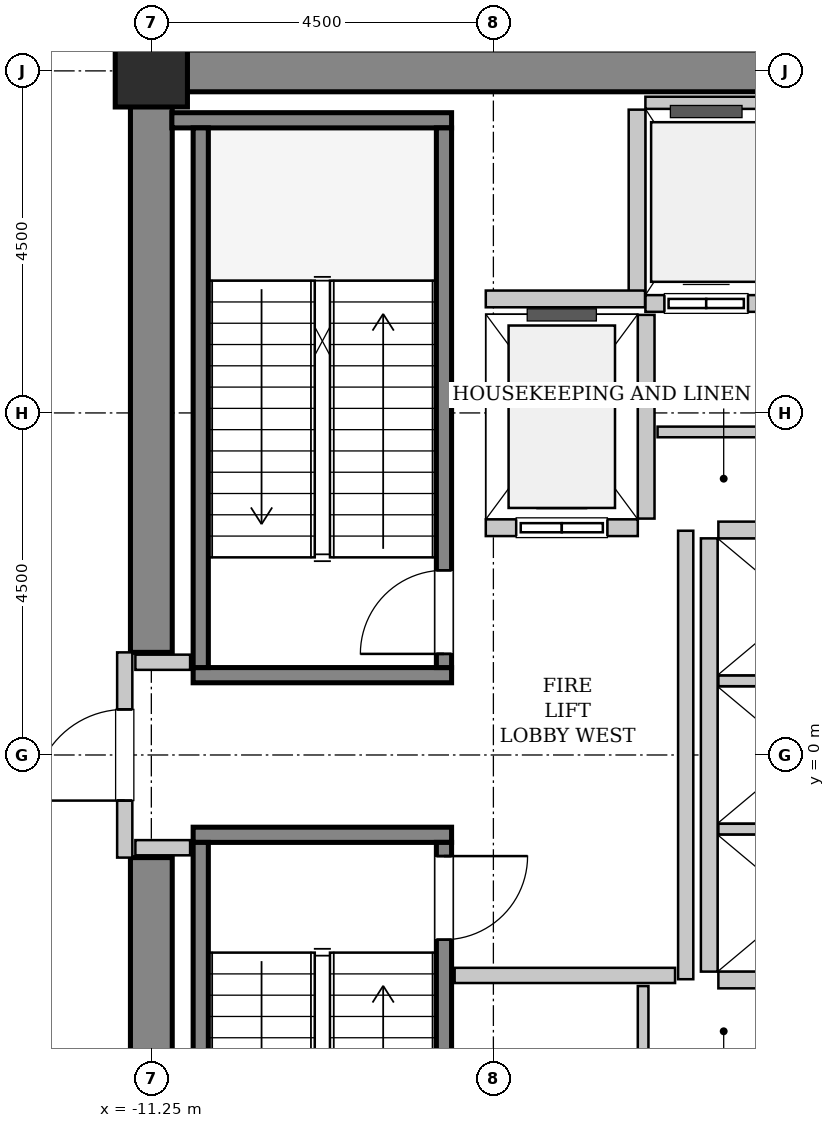
"""IFC4 building model, lengths in metres.
Left out: names, types, materials, properties, quantities, classifications, styles, units other than length and angle.
Written with IfcOpenShell. Run it as: python <this file> out.ifc"""

import sys

from ifc_helpers import new_model, si_unit, direction, frame, frame_2d, origin, origin_2d, place, context, subcontext, project, spatial, rectangle, hollow_rectangle, extrude, source, transform, mapped, element, fill, save


model = new_model("IFC4")
c1 = context("Model", 3, precision=1e-05, world=origin(), true_north=direction((0.0, 1.0)))
c2 = subcontext(c1, "Body", "Model", "MODEL_VIEW")
j1 = project(units=[si_unit("LENGTHUNIT", "METRE"), si_unit("PLANEANGLEUNIT", "RADIAN")], contexts=[c1])
p1 = place(None, origin())
s1 = spatial("IfcSite", under=j1, at=p1, CompositionType="ELEMENT")
p2 = place(p1, origin())
s2 = spatial("IfcBuilding", under=s1, at=p2, CompositionType="ELEMENT")
p3 = place(p2, frame((0.0, 0.0, 144.0)))
s3 = spatial("IfcBuildingStorey", under=s2, at=p3, CompositionType="ELEMENT", Elevation=144.0)
m1 = source(origin(), c2, "Body", "SweptSolid", [
    extrude(rectangle(XDim=9.975, YDim=0.55, at=frame_2d((4.987, 0.0))), origin(), (0.0, 0.0, 1.0), 4.8),
])
p4 = place(p3, frame((-11.525, 9.0, 0.0), z_axis=(0.0, 0.0, 1.0), x_axis=(1.0, 0.0, 0.0)))
e1 = element("IfcWall", 1, at=p4, inside=s3, PredefinedType="SHEAR", context=c2, shape_type="MappedRepresentation", body=[
    mapped(m1, transform((0.0, 0.0, 0.0), x_axis=(1.0, 0.0, 0.0), y_axis=(0.0, 1.0, 0.0), z_axis=(0.0, 0.0, 1.0), scale=1.0)),
])
m2 = source(origin(), c2, "Body", "SweptSolid", [
    extrude(rectangle(XDim=7.375, YDim=0.55, at=frame_2d((3.688, 0.0))), origin(), (0.0, 0.0, 1.0), 4.8),
])
for number, where, z_axis, x_axis in (
    (2, (-11.25, -8.725, 0.0), (0.0, 0.0, 1.0), (0.0, 1.0, 0.0)),
    (3, (-11.25, 1.35, 0.0), (0.0, 0.0, 1.0), (0.0, 1.0, 0.0)),
):
    element("IfcWall", number, at=place(p3, frame(where, z_axis=z_axis, x_axis=x_axis)), inside=s3, PredefinedType="SHEAR", context=c2, shape_type="MappedRepresentation", body=[
        mapped(m2, transform((0.0, 0.0, 0.0), x_axis=(1.0, 0.0, 0.0), y_axis=(0.0, 1.0, 0.0), z_axis=(0.0, 0.0, 1.0), scale=1.0)),
    ])
m3 = source(origin(), c2, "Body", "SweptSolid", [
    extrude(hollow_rectangle(XDim=0.95, YDim=0.95, WallThickness=0.045, InnerFilletRadius=0.045, OuterFilletRadius=0.09, at=origin_2d()), origin(), (0.0, 0.0, 1.0), 4.8),
])
p5 = place(p3, frame((-11.25, 9.0, 0.0), z_axis=(0.0, 0.0, 1.0), x_axis=(1.0, 0.0, 0.0)))
e4 = element("IfcColumn", 4, at=p5, inside=s3, PredefinedType="COLUMN", context=c2, shape_type="MappedRepresentation", body=[
    mapped(m3, transform((0.0, 0.0, 0.0), x_axis=(1.0, 0.0, 0.0), y_axis=(0.0, 1.0, 0.0), z_axis=(0.0, 0.0, 1.0), scale=1.0)),
])
m4 = source(origin(), c2, "Body", "SweptSolid", [
    extrude(rectangle(XDim=3.4, YDim=0.2, at=frame_2d((1.7, 0.0))), origin(), (0.0, 0.0, 1.0), 4.8),
])
p6 = place(p3, frame((-7.3, 1.05, 0.0), z_axis=(0.0, 0.0, 1.0), x_axis=(-1.0, 0.0, 0.0)))
e5 = element("IfcWall", 5, at=p6, inside=s3, PredefinedType="SOLIDWALL", context=c2, shape_type="MappedRepresentation", body=[
    mapped(m4, transform((0.0, 0.0, 0.0), x_axis=(1.0, 0.0, 0.0), y_axis=(0.0, 1.0, 0.0), z_axis=(0.0, 0.0, 1.0), scale=1.0)),
])
m5 = source(origin(), c2, "Body", "SweptSolid", [
    extrude(rectangle(XDim=3.68, YDim=0.2, at=frame_2d((1.84, 0.0))), origin(), (0.0, 0.0, 1.0), 4.8),
])
p7 = place(p3, frame((-7.3, 8.35, 0.0), z_axis=(0.0, 0.0, 1.0), x_axis=(-1.0, 0.0, 0.0)))
e6 = element("IfcWall", 6, at=p7, inside=s3, PredefinedType="SOLIDWALL", context=c2, shape_type="MappedRepresentation", body=[
    mapped(m5, transform((0.0, 0.0, 0.0), x_axis=(1.0, 0.0, 0.0), y_axis=(0.0, 1.0, 0.0), z_axis=(0.0, 0.0, 1.0), scale=1.0)),
])
m6 = source(origin(), c2, "Body", "SweptSolid", [
    extrude(rectangle(XDim=7.1, YDim=0.2, at=frame_2d((3.55, 0.0))), origin(), (0.0, 0.0, 1.0), 4.8),
])
p8 = place(p3, frame((-7.4, 1.15, 0.0), z_axis=(0.0, 0.0, 1.0), x_axis=(0.0, 1.0, 0.0)))
e7 = element("IfcWall", 7, at=p8, inside=s3, PredefinedType="SOLIDWALL", context=c2, shape_type="MappedRepresentation", body=[
    mapped(m6, transform((0.0, 0.0, 0.0), x_axis=(1.0, 0.0, 0.0), y_axis=(0.0, 1.0, 0.0), z_axis=(0.0, 0.0, 1.0), scale=1.0)),
])
p9 = place(p8, frame((0.18, 0.0, 0.0)))
e8 = element("IfcOpeningElement", 8, at=p9, cuts=e7, PredefinedType="OPENING", context=c2, shape_type="SweptSolid", body=[
    extrude(rectangle(XDim=1.1, YDim=2.15, at=frame_2d((0.55, 1.075))), frame((0.0, 0.11, 0.0), z_axis=(0.0, -1.0, 0.0), x_axis=(1.0, 0.0, 0.0)), (0.0, 0.0, 1.0), 0.22),
])
p10 = place(p3, frame((-10.6, 1.15, 0.0), z_axis=(0.0, 0.0, 1.0), x_axis=(0.0, 1.0, 0.0)))
e9 = element("IfcWall", 9, at=p10, inside=s3, PredefinedType="SOLIDWALL", context=c2, shape_type="MappedRepresentation", body=[
    mapped(m6, transform((0.0, 0.0, 0.0), x_axis=(1.0, 0.0, 0.0), y_axis=(0.0, 1.0, 0.0), z_axis=(0.0, 0.0, 1.0), scale=1.0)),
])
p11 = place(p3, frame((-10.7, -1.05, 0.0), z_axis=(0.0, 0.0, 1.0), x_axis=(1.0, 0.0, 0.0)))
e10 = element("IfcWall", 10, at=p11, inside=s3, PredefinedType="SOLIDWALL", context=c2, shape_type="MappedRepresentation", body=[
    mapped(m4, transform((0.0, 0.0, 0.0), x_axis=(1.0, 0.0, 0.0), y_axis=(0.0, 1.0, 0.0), z_axis=(0.0, 0.0, 1.0), scale=1.0)),
])
p12 = place(p3, frame((-10.6, -1.15, 0.0), z_axis=(0.0, 0.0, 1.0), x_axis=(0.0, -1.0, 0.0)))
e11 = element("IfcWall", 11, at=p12, inside=s3, PredefinedType="SOLIDWALL", context=c2, shape_type="MappedRepresentation", body=[
    mapped(m6, transform((0.0, 0.0, 0.0), x_axis=(1.0, 0.0, 0.0), y_axis=(0.0, 1.0, 0.0), z_axis=(0.0, 0.0, 1.0), scale=1.0)),
])
p13 = place(p3, frame((-7.4, -1.15, 0.0), z_axis=(0.0, 0.0, 1.0), x_axis=(0.0, -1.0, 0.0)))
e12 = element("IfcWall", 12, at=p13, inside=s3, PredefinedType="SOLIDWALL", context=c2, shape_type="MappedRepresentation", body=[
    mapped(m6, transform((0.0, 0.0, 0.0), x_axis=(1.0, 0.0, 0.0), y_axis=(0.0, 1.0, 0.0), z_axis=(0.0, 0.0, 1.0), scale=1.0)),
])
p14 = place(p13, frame((0.18, 0.0, 0.0)))
e13 = element("IfcOpeningElement", 13, at=p14, cuts=e12, PredefinedType="OPENING", context=c2, shape_type="SweptSolid", body=[
    extrude(rectangle(XDim=1.1, YDim=2.15, at=frame_2d((0.55, 1.075))), frame((0.0, 0.11, 0.0), z_axis=(0.0, -1.0, 0.0), x_axis=(1.0, 0.0, 0.0)), (0.0, 0.0, 1.0), 0.22),
])
m7 = source(origin(), c2, "Body", "SweptSolid", [
    extrude(rectangle(XDim=2.0, YDim=0.22, at=frame_2d((1.0, 0.0))), origin(), (0.0, 0.0, 1.0), 4.535),
])
p15 = place(p3, frame((-6.85, 2.99, 0.0), z_axis=(0.0, 0.0, 1.0), x_axis=(1.0, 0.0, 0.0)))
e14 = element("IfcWall", 14, at=p15, inside=s3, PredefinedType="SOLIDWALL", context=c2, shape_type="MappedRepresentation", body=[
    mapped(m7, transform((0.0, 0.0, 0.0), x_axis=(1.0, 0.0, 0.0), y_axis=(0.0, 1.0, 0.0), z_axis=(0.0, 0.0, 1.0), scale=1.0)),
])
p16 = place(p15, frame((0.4, 0.0, 0.0)))
e15 = element("IfcOpeningElement", 15, at=p16, cuts=e14, PredefinedType="OPENING", context=c2, shape_type="SweptSolid", body=[
    extrude(rectangle(XDim=1.2, YDim=2.2, at=frame_2d((0.6, 1.1))), frame((0.0, 0.12, 0.0), z_axis=(0.0, -1.0, 0.0), x_axis=(1.0, 0.0, 0.0)), (0.0, 0.0, 1.0), 0.24),
])
m8 = source(origin(), c2, "Body", "SweptSolid", [
    extrude(rectangle(XDim=2.68, YDim=0.22, at=frame_2d((1.34, 0.0))), origin(), (0.0, 0.0, 1.0), 4.535),
])
p17 = place(p3, frame((-4.74, 3.11, 0.0), z_axis=(0.0, 0.0, 1.0), x_axis=(0.0, 1.0, 0.0)))
e16 = element("IfcWall", 16, at=p17, inside=s3, PredefinedType="SOLIDWALL", context=c2, shape_type="MappedRepresentation", body=[
    mapped(m8, transform((0.0, 0.0, 0.0), x_axis=(1.0, 0.0, 0.0), y_axis=(0.0, 1.0, 0.0), z_axis=(0.0, 0.0, 1.0), scale=1.0)),
])
m9 = source(origin(), c2, "Body", "SweptSolid", [
    extrude(rectangle(XDim=3.2, YDim=0.22, at=frame_2d((1.6, 0.0))), origin(), (0.0, 0.0, 1.0), 4.535),
])
p18 = place(p3, frame((-4.75, 5.94, 0.0), z_axis=(0.0, 0.0, 1.0), x_axis=(1.0, 0.0, 0.0)))
e17 = element("IfcWall", 17, at=p18, inside=s3, PredefinedType="SOLIDWALL", context=c2, shape_type="MappedRepresentation", body=[
    mapped(m9, transform((0.0, 0.0, 0.0), x_axis=(1.0, 0.0, 0.0), y_axis=(0.0, 1.0, 0.0), z_axis=(0.0, 0.0, 1.0), scale=1.0)),
])
p19 = place(p18, frame((0.25, 0.0, 0.0)))
e18 = element("IfcOpeningElement", 18, at=p19, cuts=e17, PredefinedType="OPENING", context=c2, shape_type="SweptSolid", body=[
    extrude(rectangle(XDim=1.1, YDim=2.2, at=frame_2d((0.55, 1.1))), frame((0.0, 0.12, 0.0), z_axis=(0.0, -1.0, 0.0), x_axis=(1.0, 0.0, 0.0)), (0.0, 0.0, 1.0), 0.24),
])
p20 = place(p18, frame((1.875, 0.0, 0.0)))
e19 = element("IfcOpeningElement", 19, at=p20, cuts=e17, PredefinedType="OPENING", context=c2, shape_type="SweptSolid", body=[
    extrude(rectangle(XDim=1.1, YDim=2.2, at=frame_2d((0.55, 1.1))), frame((0.0, 0.12, 0.0), z_axis=(0.0, -1.0, 0.0), x_axis=(1.0, 0.0, 0.0)), (0.0, 0.0, 1.0), 0.24),
])
m10 = source(origin(), c2, "Body", "SweptSolid", [
    extrude(rectangle(XDim=3.2, YDim=0.16, at=frame_2d((1.6, 0.0))), origin(), (0.0, 0.0, 1.0), 3.425),
])
p21 = place(p3, frame((-1.55, 8.58, 0.0), z_axis=(0.0, 0.0, 1.0), x_axis=(-1.0, 0.0, 0.0)))
e20 = element("IfcWall", 20, at=p21, inside=s3, PredefinedType="PARTITIONING", context=c2, shape_type="MappedRepresentation", body=[
    mapped(m10, transform((0.0, 0.0, 0.0), x_axis=(1.0, 0.0, 0.0), y_axis=(0.0, 1.0, 0.0), z_axis=(0.0, 0.0, 1.0), scale=1.0)),
])
m11 = source(origin(), c2, "Body", "SweptSolid", [
    extrude(rectangle(XDim=2.43, YDim=0.22, at=frame_2d((1.215, 0.0))), origin(), (0.0, 0.0, 1.0), 4.535),
])
p22 = place(p3, frame((-4.86, 8.49, 0.0), z_axis=(0.0, 0.0, 1.0), x_axis=(0.0, -1.0, 0.0)))
e21 = element("IfcWall", 21, at=p22, inside=s3, PredefinedType="SOLIDWALL", context=c2, shape_type="MappedRepresentation", body=[
    mapped(m11, transform((0.0, 0.0, 0.0), x_axis=(1.0, 0.0, 0.0), y_axis=(0.0, 1.0, 0.0), z_axis=(0.0, 0.0, 1.0), scale=1.0)),
])
m12 = source(origin(), c2, "Body", "SweptSolid", [
    extrude(rectangle(XDim=5.7, YDim=0.22, at=frame_2d((2.85, 0.0))), origin(), (0.0, 0.0, 1.0), 4.535),
])
p23 = place(p3, frame((-3.91, 2.85, 0.0), z_axis=(0.0, 0.0, 1.0), x_axis=(0.0, -1.0, 0.0)))
e22 = element("IfcWall", 22, at=p23, inside=s3, PredefinedType="SOLIDWALL", context=c2, shape_type="MappedRepresentation", body=[
    mapped(m12, transform((0.0, 0.0, 0.0), x_axis=(1.0, 0.0, 0.0), y_axis=(0.0, 1.0, 0.0), z_axis=(0.0, 0.0, 1.0), scale=1.0)),
])
m13 = source(origin(), c2, "Body", "SweptSolid", [
    extrude(rectangle(XDim=2.13, YDim=0.22, at=frame_2d((1.065, 0.0))), origin(), (0.0, 0.0, 1.0), 4.535),
])
p24 = place(p3, frame((-3.79, -2.96, 0.0), z_axis=(0.0, 0.0, 1.0), x_axis=(1.0, 0.0, 0.0)))
e23 = element("IfcWall", 23, at=p24, inside=s3, PredefinedType="SOLIDWALL", context=c2, shape_type="MappedRepresentation", body=[
    mapped(m13, transform((0.0, 0.0, 0.0), x_axis=(1.0, 0.0, 0.0), y_axis=(0.0, 1.0, 0.0), z_axis=(0.0, 0.0, 1.0), scale=1.0)),
])
m14 = source(origin(), c2, "Body", "SweptSolid", [
    extrude(rectangle(XDim=2.13, YDim=0.14, at=frame_2d((1.065, 0.0))), origin(), (0.0, 0.0, 1.0), 4.535),
])
for number, where, z_axis, x_axis in (
    (24, (-3.79, -0.975, 0.0), (0.0, 0.0, 1.0), (1.0, 0.0, 0.0)),
    (25, (-3.79, 0.975, 0.0), (0.0, 0.0, 1.0), (1.0, 0.0, 0.0)),
):
    element("IfcWall", number, at=place(p3, frame(where, z_axis=z_axis, x_axis=x_axis)), inside=s3, PredefinedType="PARTITIONING", context=c2, shape_type="MappedRepresentation", body=[
        mapped(m14, transform((0.0, 0.0, 0.0), x_axis=(1.0, 0.0, 0.0), y_axis=(0.0, 1.0, 0.0), z_axis=(0.0, 0.0, 1.0), scale=1.0)),
    ])
p25 = place(p3, frame((-1.66, 2.96, 0.0), z_axis=(0.0, 0.0, 1.0), x_axis=(-1.0, 0.0, 0.0)))
e26 = element("IfcWall", 26, at=p25, inside=s3, PredefinedType="SOLIDWALL", context=c2, shape_type="MappedRepresentation", body=[
    mapped(m13, transform((0.0, 0.0, 0.0), x_axis=(1.0, 0.0, 0.0), y_axis=(0.0, 1.0, 0.0), z_axis=(0.0, 0.0, 1.0), scale=1.0)),
])
m15 = source(origin(), c2, "Body", "SweptSolid", [
    extrude(rectangle(XDim=2.095, YDim=0.22, at=frame_2d((1.048, 0.0))), origin(), (0.0, 0.0, 1.0), 4.535),
])
p26 = place(p3, frame((-6.85, 6.0, 0.0), z_axis=(0.0, 0.0, 1.0), x_axis=(1.0, 0.0, 0.0)))
e27 = element("IfcWall", 27, at=p26, inside=s3, PredefinedType="SOLIDWALL", context=c2, shape_type="MappedRepresentation", body=[
    mapped(m15, transform((0.0, 0.0, 0.0), x_axis=(1.0, 0.0, 0.0), y_axis=(0.0, 1.0, 0.0), z_axis=(0.0, 0.0, 1.0), scale=1.0)),
])
m16 = source(origin(), c2, "Body", "SweptSolid", [
    extrude(rectangle(XDim=2.7, YDim=0.2, at=frame_2d((1.35, 0.0))), origin(), (0.0, 0.0, 1.0), 3.425),
])
p27 = place(p3, frame((-11.6, -1.35, 0.0), z_axis=(0.0, 0.0, 1.0), x_axis=(0.0, 1.0, 0.0)))
e28 = element("IfcWall", 28, at=p27, inside=s3, PredefinedType="PARTITIONING", context=c2, shape_type="MappedRepresentation", body=[
    mapped(m16, transform((0.0, 0.0, 0.0), x_axis=(1.0, 0.0, 0.0), y_axis=(0.0, 1.0, 0.0), z_axis=(0.0, 0.0, 1.0), scale=1.0)),
])
p28 = place(p27, frame((0.75, 0.0, 0.0)))
e29 = element("IfcOpeningElement", 29, at=p28, cuts=e28, PredefinedType="OPENING", context=c2, shape_type="SweptSolid", body=[
    extrude(rectangle(XDim=1.2, YDim=2.15, at=frame_2d((0.6, 1.075))), frame((0.0, 0.11, 0.0), z_axis=(0.0, -1.0, 0.0), x_axis=(1.0, 0.0, 0.0)), (0.0, 0.0, 1.0), 0.22),
])
m17 = source(origin(), c2, "Body", "SweptSolid", [
    extrude(rectangle(XDim=5.9, YDim=0.2, at=frame_2d((2.95, 0.0))), origin(), (0.0, 0.0, 1.0), 4.535),
])
p29 = place(p3, frame((-4.22, -2.95, 0.0), z_axis=(0.0, 0.0, 1.0), x_axis=(0.0, 1.0, 0.0)))
e30 = element("IfcWall", 30, at=p29, inside=s3, PredefinedType="PARTITIONING", context=c2, shape_type="MappedRepresentation", body=[
    mapped(m17, transform((0.0, 0.0, 0.0), x_axis=(1.0, 0.0, 0.0), y_axis=(0.0, 1.0, 0.0), z_axis=(0.0, 0.0, 1.0), scale=1.0)),
])
m18 = source(origin(), c2, "Body", "SweptSolid", [
    extrude(rectangle(XDim=2.9, YDim=0.2, at=frame_2d((1.45, 0.0))), origin(), (0.0, 0.0, 1.0), 4.535),
])
p30 = place(p3, frame((-7.26, -2.9, 0.0), z_axis=(0.0, 0.0, 1.0), x_axis=(1.0, 0.0, 0.0)))
e31 = element("IfcWall", 31, at=p30, inside=s3, PredefinedType="PARTITIONING", context=c2, shape_type="MappedRepresentation", body=[
    mapped(m18, transform((0.0, 0.0, 0.0), x_axis=(1.0, 0.0, 0.0), y_axis=(0.0, 1.0, 0.0), z_axis=(0.0, 0.0, 1.0), scale=1.0)),
])
m19 = source(origin(), c2, "Body", "SweptSolid", [
    extrude(rectangle(XDim=0.72, YDim=0.2, at=frame_2d((0.36, 0.0))), origin(), (0.0, 0.0, 1.0), 4.535),
])
for number, where, z_axis, x_axis in (
    (32, (-11.46, 1.22, 0.0), (0.0, 0.0, 1.0), (1.0, 0.0, 0.0)),
    (33, (-11.46, -1.22, 0.0), (0.0, 0.0, 1.0), (1.0, 0.0, 0.0)),
):
    element("IfcWall", number, at=place(p3, frame(where, z_axis=z_axis, x_axis=x_axis)), inside=s3, PredefinedType="PARTITIONING", context=c2, shape_type="MappedRepresentation", body=[
        mapped(m19, transform((0.0, 0.0, 0.0), x_axis=(1.0, 0.0, 0.0), y_axis=(0.0, 1.0, 0.0), z_axis=(0.0, 0.0, 1.0), scale=1.0)),
    ])
m20 = source(origin(), c2, "Body", "SweptSolid", [
    extrude(rectangle(XDim=2.95, YDim=0.14, at=frame_2d((1.475, 0.0))), origin(), (0.0, 0.0, 1.0), 4.535),
])
p31 = place(p3, frame((-4.59, 4.25, 0.0), z_axis=(0.0, 0.0, 1.0), x_axis=(1.0, 0.0, 0.0)))
e34 = element("IfcWall", 34, at=p31, inside=s3, PredefinedType="PARTITIONING", context=c2, shape_type="MappedRepresentation", body=[
    mapped(m20, transform((0.0, 0.0, 0.0), x_axis=(1.0, 0.0, 0.0), y_axis=(0.0, 1.0, 0.0), z_axis=(0.0, 0.0, 1.0), scale=1.0)),
])
m21 = source(origin(), c2, "Body", "SweptSolid", [
    extrude(rectangle(XDim=1.1, YDim=0.14, at=frame_2d((0.55, 0.0))), origin(), (0.0, 0.0, 1.0), 4.535),
])
p32 = place(p3, frame((-4.78, -4.14, 0.0), z_axis=(0.0, 0.0, 1.0), x_axis=(0.0, 1.0, 0.0)))
e35 = element("IfcWall", 35, at=p32, inside=s3, PredefinedType="PARTITIONING", context=c2, shape_type="MappedRepresentation", body=[
    mapped(m21, transform((0.0, 0.0, 0.0), x_axis=(1.0, 0.0, 0.0), y_axis=(0.0, 1.0, 0.0), z_axis=(0.0, 0.0, 1.0), scale=1.0)),
])
m22 = source(origin(), c2, "Body", "SweptSolid", [
    extrude(rectangle(XDim=1.1, YDim=2.15, at=frame_2d((0.55, 1.075))), frame((0.0, 0.025, 0.0), z_axis=(0.0, -1.0, 0.0), x_axis=(1.0, 0.0, 0.0)), (0.0, 0.0, 1.0), 0.05),
])
p33 = place(p9, origin())
e36 = element("IfcDoor", 36, at=p33, inside=s3, OperationType="SINGLE_SWING_LEFT", PredefinedType="DOOR", context=c2, shape_type="MappedRepresentation", body=[
    mapped(m22, transform((0.0, 0.0, 0.0), x_axis=(1.0, 0.0, 0.0), y_axis=(0.0, 1.0, 0.0), z_axis=(0.0, 0.0, 1.0), scale=1.0)),
])
fill(e8, e36)
p34 = place(p14, origin())
e37 = element("IfcDoor", 37, at=p34, inside=s3, OperationType="SINGLE_SWING_LEFT", PredefinedType="DOOR", context=c2, shape_type="MappedRepresentation", body=[
    mapped(m22, transform((0.0, 0.0, 0.0), x_axis=(1.0, 0.0, 0.0), y_axis=(0.0, 1.0, 0.0), z_axis=(0.0, 0.0, 1.0), scale=1.0)),
])
fill(e13, e37)
m23 = source(origin(), c2, "Body", "SweptSolid", [
    extrude(rectangle(XDim=1.2, YDim=2.2, at=frame_2d((0.6, 1.1))), frame((0.0, 0.025, 0.0), z_axis=(0.0, -1.0, 0.0), x_axis=(1.0, 0.0, 0.0)), (0.0, 0.0, 1.0), 0.05),
])
p35 = place(p16, origin())
e38 = element("IfcDoor", 38, at=p35, inside=s3, OperationType="SLIDING_TO_LEFT", PredefinedType="DOOR", context=c2, shape_type="MappedRepresentation", body=[
    mapped(m23, transform((0.0, 0.0, 0.0), x_axis=(1.0, 0.0, 0.0), y_axis=(0.0, 1.0, 0.0), z_axis=(0.0, 0.0, 1.0), scale=1.0)),
])
fill(e15, e38)
m24 = source(origin(), c2, "Body", "SweptSolid", [
    extrude(rectangle(XDim=1.1, YDim=2.2, at=frame_2d((0.55, 1.1))), frame((0.0, 0.025, 0.0), z_axis=(0.0, -1.0, 0.0), x_axis=(1.0, 0.0, 0.0)), (0.0, 0.0, 1.0), 0.05),
])
p36 = place(p19, origin())
e39 = element("IfcDoor", 39, at=p36, inside=s3, OperationType="DOUBLE_DOOR_SLIDING", PredefinedType="DOOR", context=c2, shape_type="MappedRepresentation", body=[
    mapped(m24, transform((0.0, 0.0, 0.0), x_axis=(1.0, 0.0, 0.0), y_axis=(0.0, 1.0, 0.0), z_axis=(0.0, 0.0, 1.0), scale=1.0)),
])
fill(e18, e39)
m25 = source(origin(), c2, "Body", "SweptSolid", [
    extrude(rectangle(XDim=1.2, YDim=2.15, at=frame_2d((0.6, 1.075))), frame((0.0, 0.025, 0.0), z_axis=(0.0, -1.0, 0.0), x_axis=(1.0, 0.0, 0.0)), (0.0, 0.0, 1.0), 0.05),
])
p37 = place(p28, origin())
e40 = element("IfcDoor", 40, at=p37, inside=s3, OperationType="SINGLE_SWING_LEFT", PredefinedType="DOOR", context=c2, shape_type="MappedRepresentation", body=[
    mapped(m25, transform((0.0, 0.0, 0.0), x_axis=(1.0, 0.0, 0.0), y_axis=(0.0, 1.0, 0.0), z_axis=(0.0, 0.0, 1.0), scale=1.0)),
])
fill(e29, e40)
save(model, sys.argv[1])
